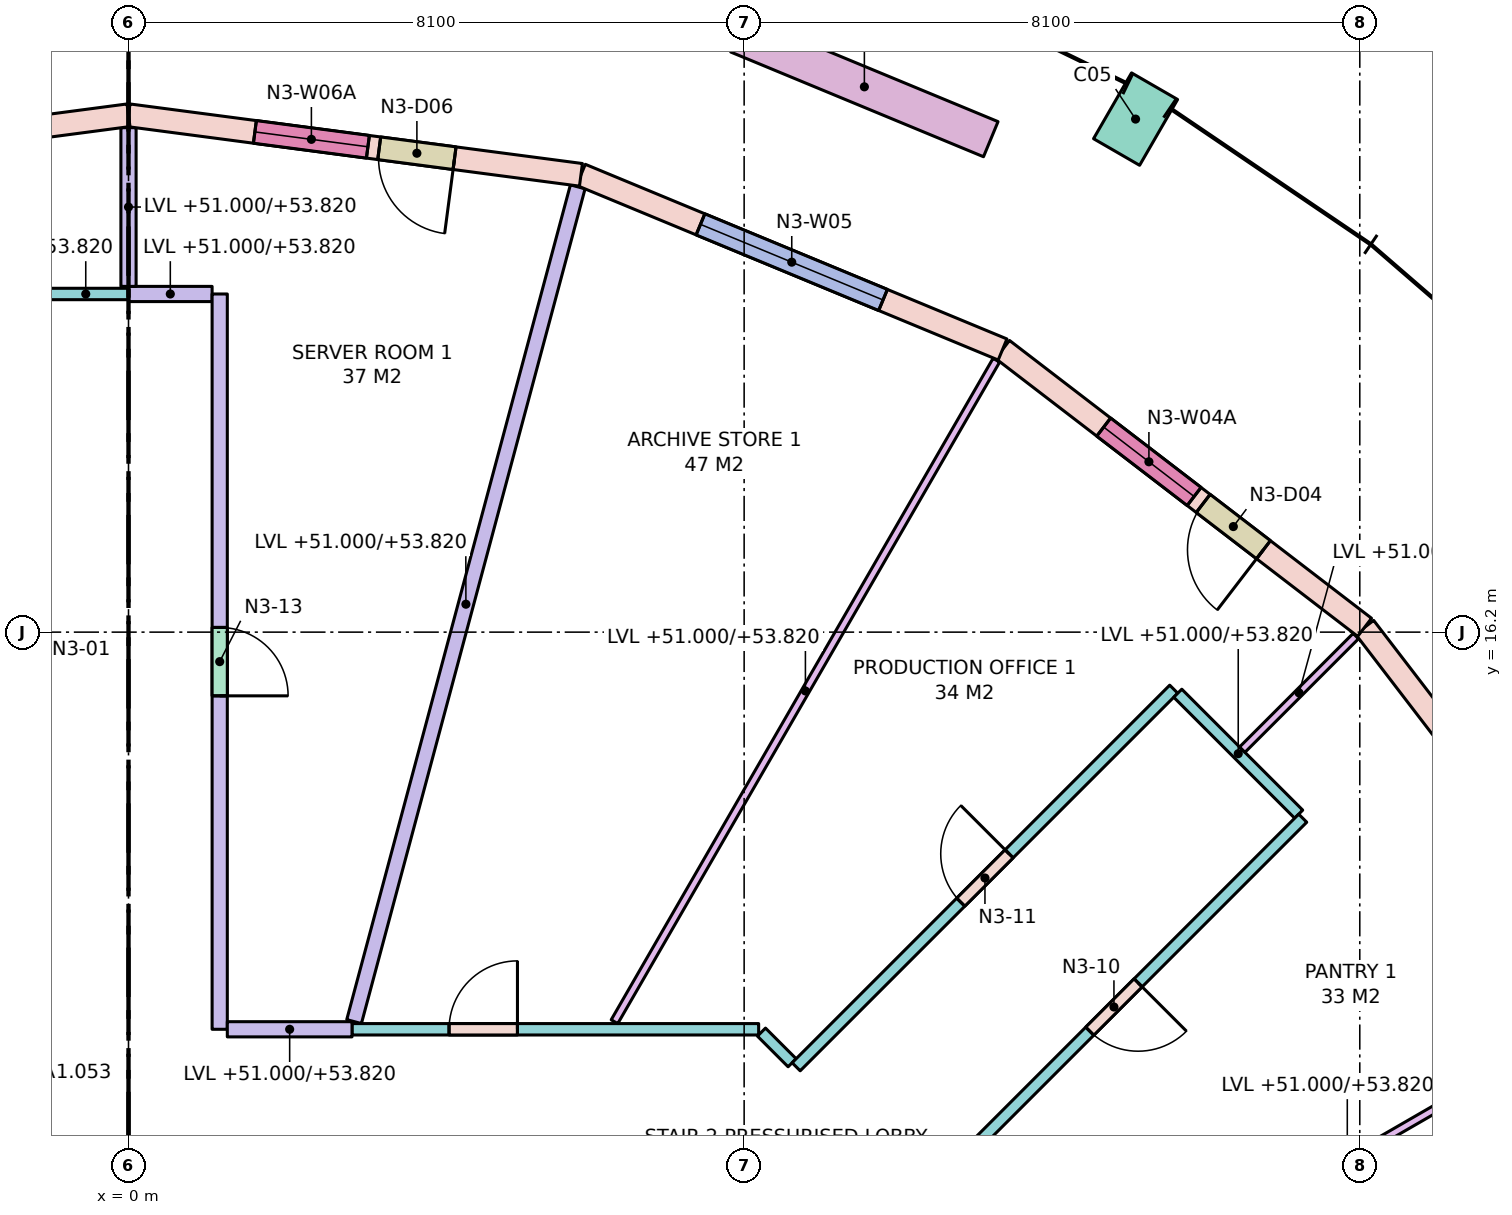
"""IFC4 building model, lengths in metres.
Left out: names, types, materials, properties, quantities, classifications, styles, units other than length and angle.
Written with IfcOpenShell. Run it as: python <this file> out.ifc"""

import sys

from ifc_helpers import new_model, si_unit, direction, frame, frame_2d, origin, origin_2d, place, context, subcontext, project, spatial, rectangle, extrude, element, fill, save


model = new_model("IFC4")
c1 = context("Model", 3, precision=1e-05, world=origin(), true_north=direction((0.0, 1.0)))
c2 = subcontext(c1, "Body", "Model", "MODEL_VIEW")
j1 = project(units=[si_unit("LENGTHUNIT", "METRE"), si_unit("PLANEANGLEUNIT", "RADIAN")], contexts=[c1])
p1 = place(None, origin())
s1 = spatial("IfcSite", under=j1, at=p1, CompositionType="ELEMENT")
p2 = place(p1, origin())
s2 = spatial("IfcBuilding", under=s1, at=p2, CompositionType="ELEMENT")
p3 = place(p2, frame((0.0, 0.0, 51.0)))
s3 = spatial("IfcBuildingStorey", under=s2, at=p3, CompositionType="ELEMENT", Elevation=51.0)
p4 = place(p3, frame((13.25, 22.95, 0.0), z_axis=(0.0, 0.0, 1.0), x_axis=(-0.866025403784, 0.5, 0.0)))
e1 = element("IfcColumn", 1, at=p4, inside=s3, PredefinedType="COLUMN", context=c2, shape_type="SweptSolid", body=[
    extrude(rectangle(XDim=0.7, YDim=1.0, at=origin_2d()), origin(), (0.0, 0.0, 1.0), 4.0),
])
p5 = place(p3, frame((19.919, 11.5, 0.0), z_axis=(0.0, 0.0, 1.0), x_axis=(-0.608778912074, 0.793339924758, 0.0)))
e2 = element("IfcWall", 2, at=p5, inside=s3, PredefinedType="STANDARD", context=c2, shape_type="SweptSolid", body=[
    extrude(rectangle(XDim=6.004, YDim=0.3, at=frame_2d((3.002, 0.0))), origin(), (0.0, 0.0, 1.0), 3.72),
])
p6 = place(p5, frame((1.702, 0.0, 0.8)))
e3 = element("IfcOpeningElement", 3, at=p6, cuts=e2, PredefinedType="OPENING", context=c2, shape_type="SweptSolid", body=[
    extrude(rectangle(XDim=2.6, YDim=2.7, at=frame_2d((1.3, 1.35))), frame((0.0, 0.16, 0.0), z_axis=(0.0, -1.0, 0.0), x_axis=(1.0, 0.0, 0.0)), (0.0, 0.0, 1.0), 0.32),
])
p7 = place(p3, frame((16.263, 16.263, 0.0), z_axis=(0.0, 0.0, 1.0), x_axis=(-0.793339924758, 0.608778912074, 0.0)))
e4 = element("IfcWall", 4, at=p7, inside=s3, PredefinedType="STANDARD", context=c2, shape_type="SweptSolid", body=[
    extrude(rectangle(XDim=6.004, YDim=0.3, at=frame_2d((3.002, 0.0))), origin(), (0.0, 0.0, 1.0), 3.72),
])
p8 = place(p7, frame((1.677, 0.0, 0.0)))
e5 = element("IfcOpeningElement", 5, at=p8, cuts=e4, PredefinedType="OPENING", context=c2, shape_type="SweptSolid", body=[
    extrude(rectangle(XDim=1.0, YDim=2.4, at=frame_2d((0.5, 1.2))), frame((0.0, 0.16, 0.0), z_axis=(0.0, -1.0, 0.0), x_axis=(1.0, 0.0, 0.0)), (0.0, 0.0, 1.0), 0.32),
])
p9 = place(p7, frame((2.827, 0.0, 0.8)))
e6 = element("IfcOpeningElement", 6, at=p9, cuts=e4, PredefinedType="OPENING", context=c2, shape_type="SweptSolid", body=[
    extrude(rectangle(XDim=1.5, YDim=2.7, at=frame_2d((0.75, 1.35))), frame((0.0, 0.16, 0.0), z_axis=(0.0, -1.0, 0.0), x_axis=(1.0, 0.0, 0.0)), (0.0, 0.0, 1.0), 0.32),
])
p10 = place(p3, frame((11.5, 19.919, 0.0), z_axis=(0.0, 0.0, 1.0), x_axis=(-0.923884511653, 0.382671411433, 0.0)))
e7 = element("IfcWall", 7, at=p10, inside=s3, PredefinedType="STANDARD", context=c2, shape_type="SweptSolid", body=[
    extrude(rectangle(XDim=6.004, YDim=0.3, at=frame_2d((3.002, 0.0))), origin(), (0.0, 0.0, 1.0), 3.72),
])
p11 = place(p10, frame((1.702, 0.0, 0.8)))
e8 = element("IfcOpeningElement", 8, at=p11, cuts=e7, PredefinedType="OPENING", context=c2, shape_type="SweptSolid", body=[
    extrude(rectangle(XDim=2.6, YDim=2.7, at=frame_2d((1.3, 1.35))), frame((0.0, 0.16, 0.0), z_axis=(0.0, -1.0, 0.0), x_axis=(1.0, 0.0, 0.0)), (0.0, 0.0, 1.0), 0.32),
])
p12 = place(p3, frame((5.953, 22.216, 0.0), z_axis=(0.0, 0.0, 1.0), x_axis=(-0.991445297315, 0.130522880875, 0.0)))
e9 = element("IfcWall", 9, at=p12, inside=s3, PredefinedType="STANDARD", context=c2, shape_type="SweptSolid", body=[
    extrude(rectangle(XDim=6.004, YDim=0.3, at=frame_2d((3.002, 0.0))), origin(), (0.0, 0.0, 1.0), 3.72),
])
p13 = place(p12, frame((1.677, 0.0, 0.0)))
e10 = element("IfcOpeningElement", 10, at=p13, cuts=e9, PredefinedType="OPENING", context=c2, shape_type="SweptSolid", body=[
    extrude(rectangle(XDim=1.0, YDim=2.4, at=frame_2d((0.5, 1.2))), frame((0.0, 0.16, 0.0), z_axis=(0.0, -1.0, 0.0), x_axis=(1.0, 0.0, 0.0)), (0.0, 0.0, 1.0), 0.32),
])
p14 = place(p12, frame((2.827, 0.0, 0.8)))
e11 = element("IfcOpeningElement", 11, at=p14, cuts=e9, PredefinedType="OPENING", context=c2, shape_type="SweptSolid", body=[
    extrude(rectangle(XDim=1.5, YDim=2.7, at=frame_2d((0.75, 1.35))), frame((0.0, 0.16, 0.0), z_axis=(0.0, -1.0, 0.0), x_axis=(1.0, 0.0, 0.0)), (0.0, 0.0, 1.0), 0.32),
])
p15 = place(p3, frame((0.0, 23.0, 0.0), z_axis=(0.0, 0.0, 1.0), x_axis=(-0.991445297315, -0.130522880875, 0.0)))
e12 = element("IfcWall", 12, at=p15, inside=s3, PredefinedType="STANDARD", context=c2, shape_type="SweptSolid", body=[
    extrude(rectangle(XDim=6.004, YDim=0.3, at=frame_2d((3.002, 0.0))), origin(), (0.0, 0.0, 1.0), 3.72),
])
p16 = place(p15, frame((1.702, 0.0, 0.8)))
e13 = element("IfcOpeningElement", 13, at=p16, cuts=e12, PredefinedType="OPENING", context=c2, shape_type="SweptSolid", body=[
    extrude(rectangle(XDim=2.6, YDim=2.7, at=frame_2d((1.3, 1.35))), frame((0.0, 0.16, 0.0), z_axis=(0.0, -1.0, 0.0), x_axis=(1.0, 0.0, 0.0)), (0.0, 0.0, 1.0), 0.32),
])
p17 = place(p3, frame((11.345, 22.685, 0.0), z_axis=(0.0, 0.0, 1.0), x_axis=(-0.923885420167, 0.382669217998, 0.0)))
e14 = element("IfcWall", 14, at=p17, inside=s3, PredefinedType="PARAPET", context=c2, shape_type="SweptSolid", body=[
    extrude(rectangle(XDim=3.6, YDim=0.5, at=frame_2d((1.8, 0.0))), origin(), (0.0, 0.0, 1.0), 0.9),
])
p18 = place(p3, frame((-1.125, 20.649, 0.0), z_axis=(0.0, 0.0, 1.0), x_axis=(1.0, 0.0, 0.0)))
e15 = element("IfcWall", 15, at=p18, inside=s3, PredefinedType="PARTITIONING", context=c2, shape_type="SweptSolid", body=[
    extrude(rectangle(XDim=1.125, YDim=0.15, at=frame_2d((0.562, 0.0))), origin(), (0.0, 0.0, 1.0), 2.82),
])
p19 = place(p3, frame((0.0, 20.649, 0.0), z_axis=(0.0, 0.0, 1.0), x_axis=(1.0, 0.0, 0.0)))
e16 = element("IfcWall", 16, at=p19, inside=s3, PredefinedType="PARTITIONING", context=c2, shape_type="SweptSolid", body=[
    extrude(rectangle(XDim=1.1, YDim=0.2, at=frame_2d((0.55, 0.0))), origin(), (0.0, 0.0, 1.0), 2.82),
])
p20 = place(p3, frame((1.2, 20.649, 0.0), z_axis=(0.0, 0.0, 1.0), x_axis=(0.0, -1.0, 0.0)))
e17 = element("IfcWall", 17, at=p20, inside=s3, PredefinedType="PARTITIONING", context=c2, shape_type="SweptSolid", body=[
    extrude(rectangle(XDim=9.674, YDim=0.2, at=frame_2d((4.837, 0.0))), origin(), (0.0, 0.0, 1.0), 3.72),
])
p21 = place(p20, frame((4.387, 0.0, 0.0)))
e18 = element("IfcOpeningElement", 18, at=p21, cuts=e17, PredefinedType="OPENING", context=c2, shape_type="SweptSolid", body=[
    extrude(rectangle(XDim=0.9, YDim=2.1, at=frame_2d((0.45, 1.05))), frame((0.0, 0.11, 0.0), z_axis=(0.0, -1.0, 0.0), x_axis=(1.0, 0.0, 0.0)), (0.0, 0.0, 1.0), 0.22),
])
p22 = place(p3, frame((1.3, 10.975, 0.0), z_axis=(0.0, 0.0, 1.0), x_axis=(1.0, 0.0, 0.0)))
e19 = element("IfcWall", 19, at=p22, inside=s3, PredefinedType="PARTITIONING", context=c2, shape_type="SweptSolid", body=[
    extrude(rectangle(XDim=1.641, YDim=0.2, at=frame_2d((0.82, 0.0))), origin(), (0.0, 0.0, 1.0), 2.82),
])
p23 = place(p3, frame((2.941, 10.975, 0.0), z_axis=(0.0, 0.0, 1.0), x_axis=(1.0, 0.0, 0.0)))
e20 = element("IfcWall", 20, at=p23, inside=s3, PredefinedType="PARTITIONING", context=c2, shape_type="SweptSolid", body=[
    extrude(rectangle(XDim=5.35, YDim=0.15, at=frame_2d((2.675, 0.0))), origin(), (0.0, 0.0, 1.0), 2.82),
])
p24 = place(p23, frame((1.277, 0.0, 0.0)))
e21 = element("IfcOpeningElement", 21, at=p24, cuts=e20, PredefinedType="OPENING", context=c2, shape_type="SweptSolid", body=[
    extrude(rectangle(XDim=0.9, YDim=2.1, at=frame_2d((0.45, 1.05))), frame((0.0, 0.085, 0.0), z_axis=(0.0, -1.0, 0.0), x_axis=(1.0, 0.0, 0.0)), (0.0, 0.0, 1.0), 0.17),
])
p25 = place(p3, frame((8.328, 10.938, 0.0), z_axis=(0.0, 0.0, 1.0), x_axis=(0.707106781187, -0.707106781187, 0.0)))
e22 = element("IfcWall", 22, at=p25, inside=s3, PredefinedType="PARTITIONING", context=c2, shape_type="SweptSolid", body=[
    extrude(rectangle(XDim=0.571, YDim=0.15, at=frame_2d((0.285, 0.0))), origin(), (0.0, 0.0, 1.0), 3.72),
])
p26 = place(p3, frame((8.784, 10.481, 0.0), z_axis=(0.0, 0.0, 1.0), x_axis=(0.707089406061, 0.707124155885, 0.0)))
e23 = element("IfcWall", 23, at=p26, inside=s3, PredefinedType="PARTITIONING", context=c2, shape_type="SweptSolid", body=[
    extrude(rectangle(XDim=7.026, YDim=0.15, at=frame_2d((3.513, 0.0))), origin(), (0.0, 0.0, 1.0), 3.72),
])
p27 = place(p26, frame((3.063, 0.0, 0.0)))
e24 = element("IfcOpeningElement", 24, at=p27, cuts=e23, PredefinedType="OPENING", context=c2, shape_type="SweptSolid", body=[
    extrude(rectangle(XDim=0.9, YDim=2.1, at=frame_2d((0.45, 1.05))), frame((0.0, 0.085, 0.0), z_axis=(0.0, -1.0, 0.0), x_axis=(1.0, 0.0, 0.0)), (0.0, 0.0, 1.0), 0.17),
])
p28 = place(p3, frame((13.805, 15.396, 0.0), z_axis=(0.0, 0.0, 1.0), x_axis=(0.707106781187, -0.707106781187, 0.0)))
e25 = element("IfcWall", 25, at=p28, inside=s3, PredefinedType="PARTITIONING", context=c2, shape_type="SweptSolid", body=[
    extrude(rectangle(XDim=2.25, YDim=0.15, at=frame_2d((1.125, 0.0))), origin(), (0.0, 0.0, 1.0), 2.82),
])
p29 = place(p3, frame((15.449, 13.752, 0.0), z_axis=(0.0, 0.0, 1.0), x_axis=(-0.707124155885, -0.707089406061, 0.0)))
e26 = element("IfcWall", 26, at=p29, inside=s3, PredefinedType="PARTITIONING", context=c2, shape_type="SweptSolid", body=[
    extrude(rectangle(XDim=7.026, YDim=0.15, at=frame_2d((3.513, 0.0))), origin(), (0.0, 0.0, 1.0), 3.72),
])
p30 = place(p29, frame((3.063, 0.0, 0.0)))
e27 = element("IfcOpeningElement", 27, at=p30, cuts=e26, PredefinedType="OPENING", context=c2, shape_type="SweptSolid", body=[
    extrude(rectangle(XDim=0.9, YDim=2.1, at=frame_2d((0.45, 1.05))), frame((0.0, 0.085, 0.0), z_axis=(0.0, -1.0, 0.0), x_axis=(1.0, 0.0, 0.0)), (0.0, 0.0, 1.0), 0.17),
])
p31 = place(p3, frame((12.294, 7.098, 0.0), z_axis=(0.0, 0.0, 1.0), x_axis=(0.866010547425, 0.500025731086, 0.0)))
e28 = element("IfcWall", 28, at=p31, inside=s3, PredefinedType="PARTITIONING", context=c2, shape_type="SweptSolid", body=[
    extrude(rectangle(XDim=8.641, YDim=0.1, at=frame_2d((4.32, 0.0))), origin(), (0.0, 0.0, 1.0), 2.82),
])
p32 = place(p3, frame((14.654, 14.654, 0.0), z_axis=(0.0, 0.0, 1.0), x_axis=(0.707106781187, 0.707106781187, 0.0)))
e29 = element("IfcWall", 29, at=p32, inside=s3, PredefinedType="PARTITIONING", context=c2, shape_type="SweptSolid", body=[
    extrude(rectangle(XDim=2.113, YDim=0.1, at=frame_2d((1.057, 0.0))), origin(), (0.0, 0.0, 1.0), 2.82),
])
p33 = place(p3, frame((6.394, 11.075, 0.0), z_axis=(0.0, 0.0, 1.0), x_axis=(0.500024592647, 0.866011204747, 0.0)))
e30 = element("IfcWall", 30, at=p33, inside=s3, PredefinedType="PARTITIONING", context=c2, shape_type="SweptSolid", body=[
    extrude(rectangle(XDim=10.049, YDim=0.1, at=frame_2d((5.024, 0.0))), origin(), (0.0, 0.0, 1.0), 2.82),
])
p34 = place(p3, frame((2.968, 11.076, 0.0), z_axis=(0.0, 0.0, 1.0), x_axis=(0.258815869134, 0.965926677282, 0.0)))
e31 = element("IfcWall", 31, at=p34, inside=s3, PredefinedType="PARTITIONING", context=c2, shape_type="SweptSolid", body=[
    extrude(rectangle(XDim=11.37, YDim=0.2, at=frame_2d((5.685, 0.0))), origin(), (0.0, 0.0, 1.0), 2.82),
])
p35 = place(p3, frame((0.0, 20.749, 0.0), z_axis=(0.0, 0.0, 1.0), x_axis=(0.0, 1.0, 0.0)))
e32 = element("IfcWall", 32, at=p35, inside=s3, PredefinedType="PARTITIONING", context=c2, shape_type="SweptSolid", body=[
    extrude(rectangle(XDim=2.088, YDim=0.2, at=frame_2d((1.044, 0.0))), origin(), (0.0, 0.0, 1.0), 2.82),
])
p36 = place(p8, origin())
e33 = element("IfcDoor", 33, at=p36, inside=s3, OperationType="SINGLE_SWING_LEFT", PredefinedType="DOOR", context=c2, shape_type="SweptSolid", body=[
    extrude(rectangle(XDim=1.0, YDim=2.4, at=frame_2d((0.5, 1.2))), frame((0.0, 0.025, 0.0), z_axis=(0.0, -1.0, 0.0), x_axis=(1.0, 0.0, 0.0)), (0.0, 0.0, 1.0), 0.05),
])
fill(e5, e33)
p37 = place(p9, origin())
e34 = element("IfcWindow", 34, at=p37, inside=s3, PartitioningType="SINGLE_PANEL", PredefinedType="WINDOW", context=c2, shape_type="SweptSolid", body=[
    extrude(rectangle(XDim=1.5, YDim=2.7, at=frame_2d((0.75, 1.35))), frame((0.0, 0.03, 0.0), z_axis=(0.0, -1.0, 0.0), x_axis=(1.0, 0.0, 0.0)), (0.0, 0.0, 1.0), 0.06),
])
fill(e6, e34)
p38 = place(p11, origin())
e35 = element("IfcWindow", 35, at=p38, inside=s3, PartitioningType="SINGLE_PANEL", PredefinedType="WINDOW", context=c2, shape_type="SweptSolid", body=[
    extrude(rectangle(XDim=2.6, YDim=2.7, at=frame_2d((1.3, 1.35))), frame((0.0, 0.03, 0.0), z_axis=(0.0, -1.0, 0.0), x_axis=(1.0, 0.0, 0.0)), (0.0, 0.0, 1.0), 0.06),
])
fill(e8, e35)
p39 = place(p13, origin())
e36 = element("IfcDoor", 36, at=p39, inside=s3, OperationType="SINGLE_SWING_LEFT", PredefinedType="DOOR", context=c2, shape_type="SweptSolid", body=[
    extrude(rectangle(XDim=1.0, YDim=2.4, at=frame_2d((0.5, 1.2))), frame((0.0, 0.025, 0.0), z_axis=(0.0, -1.0, 0.0), x_axis=(1.0, 0.0, 0.0)), (0.0, 0.0, 1.0), 0.05),
])
fill(e10, e36)
p40 = place(p14, origin())
e37 = element("IfcWindow", 37, at=p40, inside=s3, PartitioningType="SINGLE_PANEL", PredefinedType="WINDOW", context=c2, shape_type="SweptSolid", body=[
    extrude(rectangle(XDim=1.5, YDim=2.7, at=frame_2d((0.75, 1.35))), frame((0.0, 0.03, 0.0), z_axis=(0.0, -1.0, 0.0), x_axis=(1.0, 0.0, 0.0)), (0.0, 0.0, 1.0), 0.06),
])
fill(e11, e37)
p41 = place(p30, origin())
e38 = element("IfcDoor", 38, at=p41, inside=s3, OperationType="SINGLE_SWING_LEFT", PredefinedType="DOOR", context=c2, shape_type="SweptSolid", body=[
    extrude(rectangle(XDim=0.9, YDim=2.1, at=frame_2d((0.45, 1.05))), frame((0.0, 0.025, 0.0), z_axis=(0.0, -1.0, 0.0), x_axis=(1.0, 0.0, 0.0)), (0.0, 0.0, 1.0), 0.05),
])
fill(e27, e38)
p42 = place(p27, origin())
e39 = element("IfcDoor", 39, at=p42, inside=s3, OperationType="SINGLE_SWING_RIGHT", PredefinedType="DOOR", context=c2, shape_type="SweptSolid", body=[
    extrude(rectangle(XDim=0.9, YDim=2.1, at=frame_2d((0.45, 1.05))), frame((0.0, 0.025, 0.0), z_axis=(0.0, -1.0, 0.0), x_axis=(1.0, 0.0, 0.0)), (0.0, 0.0, 1.0), 0.05),
])
fill(e24, e39)
p43 = place(p24, origin())
e40 = element("IfcDoor", 40, at=p43, inside=s3, OperationType="SINGLE_SWING_RIGHT", PredefinedType="DOOR", context=c2, shape_type="SweptSolid", body=[
    extrude(rectangle(XDim=0.9, YDim=2.1, at=frame_2d((0.45, 1.05))), frame((0.0, 0.025, 0.0), z_axis=(0.0, -1.0, 0.0), x_axis=(1.0, 0.0, 0.0)), (0.0, 0.0, 1.0), 0.05),
])
fill(e21, e40)
p44 = place(p21, origin())
e41 = element("IfcDoor", 41, at=p44, inside=s3, OperationType="SINGLE_SWING_RIGHT", PredefinedType="DOOR", context=c2, shape_type="SweptSolid", body=[
    extrude(rectangle(XDim=0.9, YDim=2.1, at=frame_2d((0.45, 1.05))), frame((0.0, 0.025, 0.0), z_axis=(0.0, -1.0, 0.0), x_axis=(1.0, 0.0, 0.0)), (0.0, 0.0, 1.0), 0.05),
])
fill(e18, e41)
save(model, sys.argv[1])
